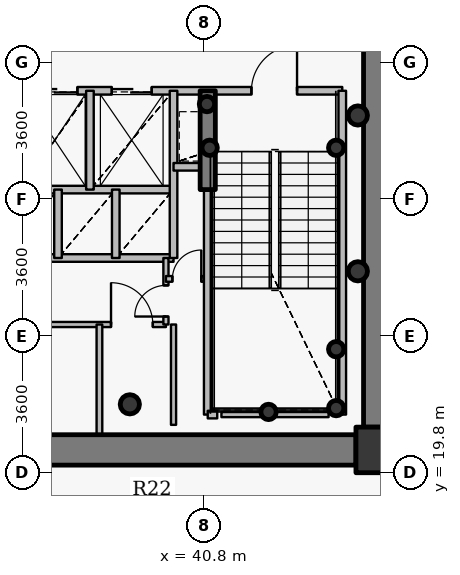
"""IFC4 building model, lengths in metres.
Left out: names, types, materials, properties, quantities, classifications, styles, units other than length and angle.
Written with IfcOpenShell. Run it as: python <this file> out.ifc"""

import sys

from ifc_helpers import new_model, si_unit, direction, frame, frame_2d, origin, origin_2d, place, context, subcontext, project, spatial, rectangle, hollow_circle, extrude, source, transform, mapped, element, fill, save


model = new_model("IFC4")
c1 = context("Model", 3, precision=1e-05, world=origin(), true_north=direction((0.0, 1.0)))
c2 = subcontext(c1, "Body", "Model", "MODEL_VIEW")
j1 = project(units=[si_unit("LENGTHUNIT", "METRE"), si_unit("PLANEANGLEUNIT", "RADIAN")], contexts=[c1])
p1 = place(None, origin())
s1 = spatial("IfcSite", under=j1, at=p1, CompositionType="ELEMENT")
p2 = place(p1, origin())
s2 = spatial("IfcBuilding", under=s1, at=p2, CompositionType="ELEMENT")
p3 = place(p2, frame((0.0, 0.0, 186.15)))
s3 = spatial("IfcBuildingStorey", under=s2, at=p3, CompositionType="ELEMENT", Elevation=186.15)
p4 = place(p3, frame((45.4, 20.4, 0.0), z_axis=(0.0, 0.0, 1.0), x_axis=(1.0, 0.0, 0.0)))
e1 = element("IfcColumn", 1, at=p4, inside=s3, PredefinedType="COLUMN", context=c2, shape_type="SweptSolid", body=[
    extrude(rectangle(XDim=1.2, YDim=1.2, at=origin_2d()), origin(), (0.0, 0.0, 1.0), 3.75),
])
p5 = place(p3, frame((38.85, 21.6, 0.0), z_axis=(0.0, 0.0, 1.0), x_axis=(1.0, 0.0, 0.0)))
e2 = element("IfcColumn", 2, at=p5, inside=s3, PredefinedType="COLUMN", context=c2, shape_type="SweptSolid", body=[
    extrude(hollow_circle(Radius=0.254, WallThickness=0.02, at=origin_2d()), origin(), (0.0, 0.0, 1.0), 3.75),
])
for number, where, z_axis, x_axis in (
    (3, (44.28, 21.5, 0.0), (0.0, 0.0, 1.0), (1.0, 0.0, 0.0)),
    (4, (44.28, 23.05, 0.0), (0.0, 0.0, 1.0), (1.0, 0.0, 0.0)),
    (5, (42.5, 21.4, 0.0), (0.0, 0.0, 1.0), (1.0, 0.0, 0.0)),
    (6, (40.95, 28.35, 0.0), (0.0, 0.0, 1.0), (1.0, 0.0, 0.0)),
    (7, (44.28, 28.35, 0.0), (0.0, 0.0, 1.0), (1.0, 0.0, 0.0)),
    (8, (40.88, 29.5, 0.0), (0.0, 0.0, 1.0), (1.0, 0.0, 0.0)),
):
    element("IfcColumn", number, at=place(p3, frame(where, z_axis=z_axis, x_axis=x_axis)), inside=s3, PredefinedType="COLUMN", context=c2, shape_type="SweptSolid", body=[
        extrude(hollow_circle(Radius=0.203, WallThickness=0.016, at=origin_2d()), origin(), (0.0, 0.0, 1.0), 3.75),
    ])
p6 = place(p3, frame((45.4, 33.0, 0.0), z_axis=(0.0, 0.0, 1.0), x_axis=(0.0, -1.0, 0.0)))
e9 = element("IfcWall", 9, at=p6, inside=s3, PredefinedType="SHEAR", context=c2, shape_type="SweptSolid", body=[
    extrude(rectangle(XDim=12.0, YDim=0.8, at=frame_2d((6.0, 0.0))), origin(), (0.0, 0.0, 1.0), 2.95),
])
p7 = place(p3, frame((44.8, 20.4, 0.0), z_axis=(0.0, 0.0, 1.0), x_axis=(-1.0, 0.0, 0.0)))
e10 = element("IfcWall", 10, at=p7, inside=s3, PredefinedType="SHEAR", context=c2, shape_type="SweptSolid", body=[
    extrude(rectangle(XDim=17.6, YDim=0.8, at=frame_2d((8.8, 0.0))), origin(), (0.0, 0.0, 1.0), 2.95),
])
p8 = place(p7, frame((9.55, 0.0, 0.0)))
e11 = element("IfcOpeningElement", 11, at=p8, cuts=e10, PredefinedType="OPENING", context=c2, shape_type="SweptSolid", body=[
    extrude(rectangle(XDim=1.15, YDim=2.15, at=origin_2d()), frame((0.575, 0.41, 1.075), z_axis=(0.0, -1.0, 0.0), x_axis=(1.0, 0.0, 0.0)), (0.0, 0.0, 1.0), 0.82),
])
p9 = place(p3, frame((40.9, 27.25, 0.0), z_axis=(0.0, 0.0, 1.0), x_axis=(0.0, 1.0, 0.0)))
e12 = element("IfcWall", 12, at=p9, inside=s3, PredefinedType="SHEAR", context=c2, shape_type="SweptSolid", body=[
    extrude(rectangle(XDim=2.6, YDim=0.4, at=frame_2d((1.3, 0.0))), origin(), (0.0, 0.0, 1.0), 3.1),
])
for number, where, z_axis, x_axis in (
    (13, (44.85, 25.1, 0.0), (0.0, 0.0, 1.0), (1.0, 0.0, 0.0)),
    (14, (44.85, 29.2, 0.0), (0.0, 0.0, 1.0), (1.0, 0.0, 0.0)),
):
    element("IfcColumn", number, at=place(p3, frame(where, z_axis=z_axis, x_axis=x_axis)), inside=s3, PredefinedType="COLUMN", context=c2, shape_type="SweptSolid", body=[
        extrude(hollow_circle(Radius=0.254, WallThickness=0.02, at=origin_2d()), origin(), (0.0, 0.0, 1.0), 3.75),
    ])
p10 = place(p3, frame((35.05, 27.25, 0.0), z_axis=(0.0, 0.0, 1.0), x_axis=(1.0, 0.0, 0.0)))
e15 = element("IfcWall", 15, at=p10, inside=s3, PredefinedType="PARTITIONING", context=c2, shape_type="SweptSolid", body=[
    extrude(rectangle(XDim=4.95, YDim=0.2, at=frame_2d((2.475, 0.0))), origin(), (0.0, 0.0, 1.0), 3.085),
])
p11 = place(p3, frame((35.45, 23.7, 0.0), z_axis=(0.0, 0.0, 1.0), x_axis=(1.0, 0.0, 0.0)))
e16 = element("IfcWall", 16, at=p11, inside=s3, PredefinedType="PARTITIONING", context=c2, shape_type="SweptSolid", body=[
    extrude(rectangle(XDim=4.35, YDim=0.135, at=frame_2d((2.175, 0.0))), origin(), (0.0, 0.0, 1.0), 3.085),
])
p12 = place(p11, frame((2.905, 0.0, 0.0)))
e17 = element("IfcOpeningElement", 17, at=p12, cuts=e16, PredefinedType="OPENING", context=c2, shape_type="SweptSolid", body=[
    extrude(rectangle(XDim=1.1, YDim=2.15, at=origin_2d()), frame((0.55, 0.078, 1.075), z_axis=(0.0, -1.0, 0.0), x_axis=(1.0, 0.0, 0.0)), (0.0, 0.0, 1.0), 0.155),
])
p13 = place(p3, frame((35.45, 25.45, 0.0), z_axis=(0.0, 0.0, 1.0), x_axis=(1.0, 0.0, 0.0)))
e18 = element("IfcWall", 18, at=p13, inside=s3, PredefinedType="PARTITIONING", context=c2, shape_type="SweptSolid", body=[
    extrude(rectangle(XDim=4.55, YDim=0.2, at=frame_2d((2.275, 0.0))), origin(), (0.0, 0.0, 1.0), 3.085),
])
p14 = place(p3, frame((35.95, 29.85, 0.0), z_axis=(0.0, 0.0, 1.0), x_axis=(1.0, 0.0, 0.0)))
e19 = element("IfcWall", 19, at=p14, inside=s3, PredefinedType="PARTITIONING", context=c2, shape_type="SweptSolid", body=[
    extrude(rectangle(XDim=8.49, YDim=0.2, at=frame_2d((4.245, 0.0))), origin(), (0.0, 0.0, 1.0), 3.085),
])
p15 = place(p14, frame((6.1, 0.0, 0.0)))
e20 = element("IfcOpeningElement", 20, at=p15, cuts=e19, PredefinedType="OPENING", context=c2, shape_type="SweptSolid", body=[
    extrude(rectangle(XDim=1.2, YDim=2.15, at=origin_2d()), frame((0.6, 0.11, 1.075), z_axis=(0.0, -1.0, 0.0), x_axis=(1.0, 0.0, 0.0)), (0.0, 0.0, 1.0), 0.22),
])
p16 = place(p14, frame((0.37, 0.0, 0.0)))
e21 = element("IfcOpeningElement", 21, at=p16, cuts=e19, PredefinedType="OPENING", context=c2, shape_type="SweptSolid", body=[
    extrude(rectangle(XDim=1.15, YDim=2.15, at=origin_2d()), frame((0.575, 0.11, 1.075), z_axis=(0.0, -1.0, 0.0), x_axis=(1.0, 0.0, 0.0)), (0.0, 0.0, 1.0), 0.22),
])
p17 = place(p14, frame((2.425, 0.0, 0.0)))
e22 = element("IfcOpeningElement", 22, at=p17, cuts=e19, PredefinedType="OPENING", context=c2, shape_type="SweptSolid", body=[
    extrude(rectangle(XDim=1.05, YDim=2.15, at=origin_2d()), frame((0.525, 0.11, 1.075), z_axis=(0.0, -1.0, 0.0), x_axis=(1.0, 0.0, 0.0)), (0.0, 0.0, 1.0), 0.22),
])
p18 = place(p3, frame((36.96, 25.45, 0.0), z_axis=(0.0, 0.0, 1.0), x_axis=(0.0, 1.0, 0.0)))
e23 = element("IfcWall", 23, at=p18, inside=s3, PredefinedType="PARTITIONING", context=c2, shape_type="SweptSolid", body=[
    extrude(rectangle(XDim=1.8, YDim=0.2, at=frame_2d((0.9, 0.0))), origin(), (0.0, 0.0, 1.0), 3.5),
])
p19 = place(p3, frame((37.8, 27.25, 0.0), z_axis=(0.0, 0.0, 1.0), x_axis=(0.0, 1.0, 0.0)))
e24 = element("IfcWall", 24, at=p19, inside=s3, PredefinedType="PARTITIONING", context=c2, shape_type="SweptSolid", body=[
    extrude(rectangle(XDim=2.6, YDim=0.2, at=frame_2d((1.3, 0.0))), origin(), (0.0, 0.0, 1.0), 3.5),
])
p20 = place(p3, frame((38.05, 20.18, 0.0), z_axis=(0.0, 0.0, 1.0), x_axis=(0.0, 1.0, 0.0)))
e25 = element("IfcWall", 25, at=p20, inside=s3, PredefinedType="PARTITIONING", context=c2, shape_type="SweptSolid", body=[
    extrude(rectangle(XDim=3.52, YDim=0.15, at=frame_2d((1.76, 0.0))), origin(), (0.0, 0.0, 1.0), 2.935),
])
p21 = place(p3, frame((38.48, 25.45, 0.0), z_axis=(0.0, 0.0, 1.0), x_axis=(0.0, 1.0, 0.0)))
e26 = element("IfcWall", 26, at=p21, inside=s3, PredefinedType="PARTITIONING", context=c2, shape_type="SweptSolid", body=[
    extrude(rectangle(XDim=1.8, YDim=0.2, at=frame_2d((0.9, 0.0))), origin(), (0.0, 0.0, 1.0), 3.5),
])
p22 = place(p3, frame((39.8, 23.7, 0.0), z_axis=(0.0, 0.0, 1.0), x_axis=(0.0, 1.0, 0.0)))
e27 = element("IfcWall", 27, at=p22, inside=s3, PredefinedType="PARTITIONING", context=c2, shape_type="SweptSolid", body=[
    extrude(rectangle(XDim=1.75, YDim=0.135, at=frame_2d((0.875, 0.0))), origin(), (0.0, 0.0, 1.0), 3.5),
])
p23 = place(p22, frame((0.21, 0.0, 0.0)))
e28 = element("IfcOpeningElement", 28, at=p23, cuts=e27, PredefinedType="OPENING", context=c2, shape_type="SweptSolid", body=[
    extrude(rectangle(XDim=0.82, YDim=2.1, at=origin_2d()), frame((0.41, 0.078, 1.05), z_axis=(0.0, -1.0, 0.0), x_axis=(1.0, 0.0, 0.0)), (0.0, 0.0, 1.0), 0.155),
])
p24 = place(p3, frame((39.8, 24.9, 0.0), z_axis=(0.0, 0.0, 1.0), x_axis=(1.0, 0.0, 0.0)))
e29 = element("IfcWall", 29, at=p24, inside=s3, PredefinedType="PARTITIONING", context=c2, shape_type="SweptSolid", body=[
    extrude(rectangle(XDim=1.1, YDim=0.15, at=frame_2d((0.55, 0.0))), origin(), (0.0, 0.0, 1.0), 3.5),
])
p25 = place(p24, frame((0.17, 0.0, 0.0)))
e30 = element("IfcOpeningElement", 30, at=p25, cuts=e29, PredefinedType="OPENING", context=c2, shape_type="SweptSolid", body=[
    extrude(rectangle(XDim=0.76, YDim=2.1, at=origin_2d()), frame((0.38, 0.085, 1.05), z_axis=(0.0, -1.0, 0.0), x_axis=(1.0, 0.0, 0.0)), (0.0, 0.0, 1.0), 0.17),
])
p26 = place(p3, frame((40.0, 25.45, 0.0), z_axis=(0.0, 0.0, 1.0), x_axis=(0.0, 1.0, 0.0)))
e31 = element("IfcWall", 31, at=p26, inside=s3, PredefinedType="PARTITIONING", context=c2, shape_type="SweptSolid", body=[
    extrude(rectangle(XDim=4.4, YDim=0.2, at=frame_2d((2.2, 0.0))), origin(), (0.0, 0.0, 1.0), 3.5),
])
p27 = place(p3, frame((40.0, 27.85, 0.0), z_axis=(0.0, 0.0, 1.0), x_axis=(1.0, 0.0, 0.0)))
e32 = element("IfcWall", 32, at=p27, inside=s3, PredefinedType="PARTITIONING", context=c2, shape_type="SweptSolid", body=[
    extrude(rectangle(XDim=0.9, YDim=0.2, at=frame_2d((0.45, 0.0))), origin(), (0.0, 0.0, 1.0), 3.5),
])
p28 = place(p3, frame((40.9, 21.33, 0.0), z_axis=(0.0, 0.0, 1.0), x_axis=(0.0, 1.0, 0.0)))
e33 = element("IfcWall", 33, at=p28, inside=s3, PredefinedType="PARTITIONING", context=c2, shape_type="SweptSolid", body=[
    extrude(rectangle(XDim=5.91, YDim=0.2, at=frame_2d((2.955, 0.0))), origin(), (0.0, 0.0, 1.0), 3.035),
])
p29 = place(p3, frame((40.9, 21.33, 0.0), z_axis=(0.0, 0.0, 1.0), x_axis=(1.0, 0.0, 0.0)))
e34 = element("IfcWall", 34, at=p29, inside=s3, PredefinedType="PARTITIONING", context=c2, shape_type="SweptSolid", body=[
    extrude(rectangle(XDim=0.25, YDim=0.2, at=frame_2d((0.125, 0.0))), origin(), (0.0, 0.0, 1.0), 3.035),
])
p30 = place(p3, frame((44.44, 21.33, 0.0), z_axis=(0.0, 0.0, 1.0), x_axis=(0.0, 1.0, 0.0)))
e35 = element("IfcWall", 35, at=p30, inside=s3, PredefinedType="PARTITIONING", context=c2, shape_type="SweptSolid", body=[
    extrude(rectangle(XDim=8.52, YDim=0.2, at=frame_2d((4.26, 0.0))), origin(), (0.0, 0.0, 1.0), 3.5),
])
p31 = place(p3, frame((44.08, 21.33, 0.0), z_axis=(0.0, 0.0, 1.0), x_axis=(-1.0, 0.0, 0.0)))
e36 = element("IfcWall", 36, at=p31, inside=s3, PredefinedType="PARTITIONING", context=c2, shape_type="SweptSolid", body=[
    extrude(rectangle(XDim=2.82, YDim=0.135, at=frame_2d((1.41, 0.0))), origin(), (0.0, 0.0, 1.0), 3.035),
])
p32 = place(p3, frame((40.0, 23.7, 0.0), z_axis=(0.0, 0.0, 1.0), x_axis=(0.0, -1.0, 0.0)))
e37 = element("IfcWall", 37, at=p32, inside=s3, PredefinedType="PARTITIONING", context=c2, shape_type="SweptSolid", body=[
    extrude(rectangle(XDim=2.64, YDim=0.135, at=frame_2d((1.32, 0.0))), origin(), (0.0, 0.0, 1.0), 3.035),
])
p33 = place(p3, frame((44.81, 20.0, 0.0), z_axis=(0.0, 0.0, 1.0), x_axis=(1.0, 0.0, 0.0)))
e38 = element("IfcWall", 38, at=p33, inside=s3, PredefinedType="PARTITIONING", context=c2, shape_type="SweptSolid", body=[
    extrude(rectangle(XDim=0.98, YDim=0.135, at=frame_2d((0.49, 0.0))), origin(), (0.0, 0.0, 1.0), 2.935),
])
m1 = source(origin(), c2, "Body", "SweptSolid", [
    extrude(rectangle(XDim=1.2, YDim=2.15, at=origin_2d()), frame((0.6, 0.025, 1.075), z_axis=(0.0, -1.0, 0.0), x_axis=(1.0, 0.0, 0.0)), (0.0, 0.0, 1.0), 0.05),
])
p34 = place(p15, origin())
e39 = element("IfcDoor", 39, at=p34, inside=s3, OperationType="SINGLE_SWING_RIGHT", PredefinedType="DOOR", context=c2, shape_type="MappedRepresentation", body=[
    mapped(m1, transform((0.0, 0.0, 0.0), x_axis=(1.0, 0.0, 0.0), y_axis=(0.0, 1.0, 0.0), z_axis=(0.0, 0.0, 1.0), scale=1.0)),
])
fill(e20, e39)
m2 = source(origin(), c2, "Body", "SweptSolid", [
    extrude(rectangle(XDim=1.15, YDim=2.15, at=origin_2d()), frame((0.575, 0.025, 1.075), z_axis=(0.0, -1.0, 0.0), x_axis=(1.0, 0.0, 0.0)), (0.0, 0.0, 1.0), 0.05),
])
p35 = place(p16, origin())
e40 = element("IfcDoor", 40, at=p35, inside=s3, OperationType="DOUBLE_DOOR_SLIDING", PredefinedType="USERDEFINED", context=c2, shape_type="MappedRepresentation", body=[
    mapped(m2, transform((0.0, 0.0, 0.0), x_axis=(1.0, 0.0, 0.0), y_axis=(0.0, 1.0, 0.0), z_axis=(0.0, 0.0, 1.0), scale=1.0)),
])
fill(e21, e40)
m3 = source(origin(), c2, "Body", "SweptSolid", [
    extrude(rectangle(XDim=1.05, YDim=2.15, at=origin_2d()), frame((0.525, 0.025, 1.075), z_axis=(0.0, -1.0, 0.0), x_axis=(1.0, 0.0, 0.0)), (0.0, 0.0, 1.0), 0.05),
])
p36 = place(p17, origin())
e41 = element("IfcDoor", 41, at=p36, inside=s3, OperationType="DOUBLE_DOOR_SLIDING", PredefinedType="USERDEFINED", context=c2, shape_type="MappedRepresentation", body=[
    mapped(m3, transform((0.0, 0.0, 0.0), x_axis=(1.0, 0.0, 0.0), y_axis=(0.0, 1.0, 0.0), z_axis=(0.0, 0.0, 1.0), scale=1.0)),
])
fill(e22, e41)
m4 = source(origin(), c2, "Body", "SweptSolid", [
    extrude(rectangle(XDim=1.1, YDim=2.15, at=origin_2d()), frame((0.55, 0.025, 1.075), z_axis=(0.0, -1.0, 0.0), x_axis=(1.0, 0.0, 0.0)), (0.0, 0.0, 1.0), 0.05),
])
p37 = place(p12, origin())
e42 = element("IfcDoor", 42, at=p37, inside=s3, OperationType="SINGLE_SWING_LEFT", PredefinedType="DOOR", context=c2, shape_type="MappedRepresentation", body=[
    mapped(m4, transform((0.0, 0.0, 0.0), x_axis=(1.0, 0.0, 0.0), y_axis=(0.0, 1.0, 0.0), z_axis=(0.0, 0.0, 1.0), scale=1.0)),
])
fill(e17, e42)
m5 = source(origin(), c2, "Body", "SweptSolid", [
    extrude(rectangle(XDim=0.82, YDim=2.1, at=origin_2d()), frame((0.41, 0.025, 1.05), z_axis=(0.0, -1.0, 0.0), x_axis=(1.0, 0.0, 0.0)), (0.0, 0.0, 1.0), 0.05),
])
p38 = place(p23, origin())
e43 = element("IfcDoor", 43, at=p38, inside=s3, OperationType="SINGLE_SWING_LEFT", PredefinedType="DOOR", context=c2, shape_type="MappedRepresentation", body=[
    mapped(m5, transform((0.0, 0.0, 0.0), x_axis=(1.0, 0.0, 0.0), y_axis=(0.0, 1.0, 0.0), z_axis=(0.0, 0.0, 1.0), scale=1.0)),
])
fill(e28, e43)
m6 = source(origin(), c2, "Body", "SweptSolid", [
    extrude(rectangle(XDim=0.76, YDim=2.1, at=origin_2d()), frame((0.38, 0.025, 1.05), z_axis=(0.0, -1.0, 0.0), x_axis=(1.0, 0.0, 0.0)), (0.0, 0.0, 1.0), 0.05),
])
p39 = place(p25, origin())
e44 = element("IfcDoor", 44, at=p39, inside=s3, OperationType="SINGLE_SWING_RIGHT", PredefinedType="DOOR", context=c2, shape_type="MappedRepresentation", body=[
    mapped(m6, transform((0.0, 0.0, 0.0), x_axis=(1.0, 0.0, 0.0), y_axis=(0.0, 1.0, 0.0), z_axis=(0.0, 0.0, 1.0), scale=1.0)),
])
fill(e30, e44)
save(model, sys.argv[1])
